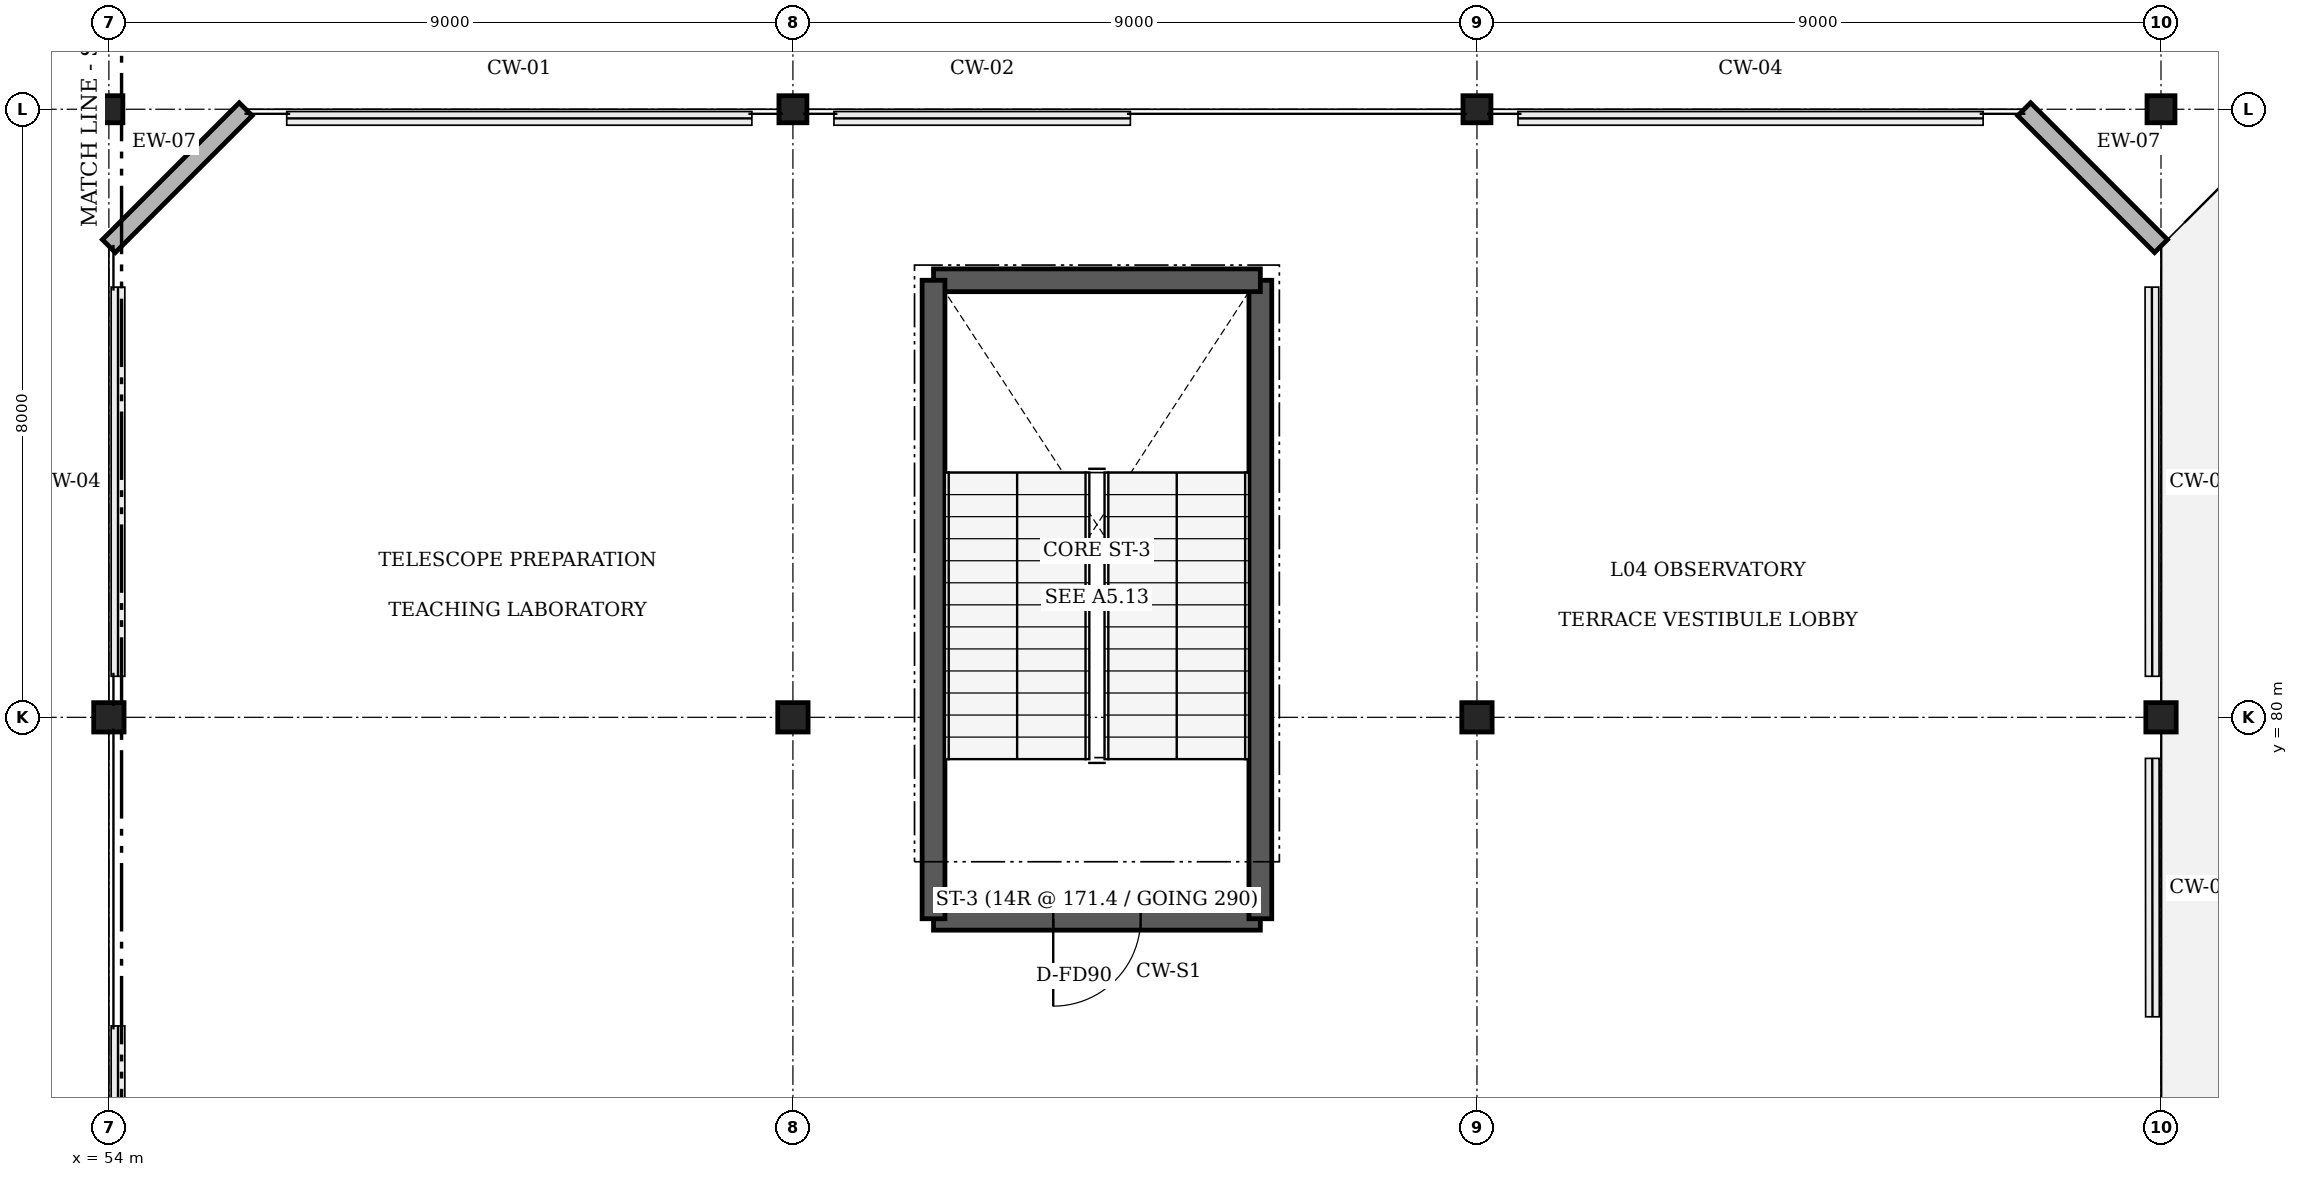
"""IFC4 building model, lengths in metres.
Left out: names, types, materials, properties, quantities, classifications, styles, units other than length and angle.
Written with IfcOpenShell. Run it as: python <this file> out.ifc"""

import sys

from ifc_helpers import new_model, si_unit, direction, frame, frame_2d, origin, origin_2d, place, context, subcontext, project, spatial, rectangle, i_section, extrude, element, fill, save


model = new_model("IFC4")
c1 = context("Model", 3, precision=1e-05, world=origin(), true_north=direction((0.0, 1.0)))
c2 = subcontext(c1, "Body", "Model", "MODEL_VIEW")
j1 = project(units=[si_unit("LENGTHUNIT", "METRE"), si_unit("PLANEANGLEUNIT", "RADIAN")], contexts=[c1])
p1 = place(None, origin())
s1 = spatial("IfcSite", under=j1, at=p1, CompositionType="ELEMENT")
p2 = place(p1, origin())
s2 = spatial("IfcBuilding", under=s1, at=p2, CompositionType="ELEMENT")
p3 = place(p2, frame((0.0, 0.0, 20.4)))
s3 = spatial("IfcBuildingStorey", under=s2, at=p3, CompositionType="ELEMENT", Elevation=20.4)
p4 = place(p3, frame((54.0, 80.0, 0.0), z_axis=(0.0, 0.0, 1.0), x_axis=(1.0, 0.0, 0.0)))
e1 = element("IfcColumn", 1, at=p4, inside=s3, PredefinedType="COLUMN", context=c2, shape_type="SweptSolid", body=[
    extrude(i_section(OverallWidth=0.399, OverallDepth=0.386, WebThickness=0.021, FlangeThickness=0.033, FilletRadius=0.015, at=origin_2d()), origin(), (0.0, 0.0, 1.0), 4.8),
])
p5 = place(p3, frame((54.0, 88.0, 0.0), z_axis=(0.0, 0.0, 1.0), x_axis=(1.0, 0.0, 0.0)))
e2 = element("IfcColumn", 2, at=p5, inside=s3, PredefinedType="COLUMN", context=c2, shape_type="SweptSolid", body=[
    extrude(i_section(OverallWidth=0.368, OverallDepth=0.356, WebThickness=0.011, FlangeThickness=0.018, FilletRadius=0.015, at=origin_2d()), origin(), (0.0, 0.0, 1.0), 4.8),
])
p6 = place(p3, frame((63.0, 80.0, 0.0), z_axis=(0.0, 0.0, 1.0), x_axis=(1.0, 0.0, 0.0)))
e3 = element("IfcColumn", 3, at=p6, inside=s3, PredefinedType="COLUMN", context=c2, shape_type="SweptSolid", body=[
    extrude(i_section(OverallWidth=0.399, OverallDepth=0.386, WebThickness=0.021, FlangeThickness=0.033, FilletRadius=0.015, at=origin_2d()), origin(), (0.0, 0.0, 1.0), 4.8),
])
p7 = place(p3, frame((63.0, 88.0, 0.0), z_axis=(0.0, 0.0, 1.0), x_axis=(1.0, 0.0, 0.0)))
e4 = element("IfcColumn", 4, at=p7, inside=s3, PredefinedType="COLUMN", context=c2, shape_type="SweptSolid", body=[
    extrude(i_section(OverallWidth=0.368, OverallDepth=0.356, WebThickness=0.011, FlangeThickness=0.018, FilletRadius=0.015, at=origin_2d()), origin(), (0.0, 0.0, 1.0), 4.8),
])
p8 = place(p3, frame((72.0, 80.0, 0.0), z_axis=(0.0, 0.0, 1.0), x_axis=(1.0, 0.0, 0.0)))
e5 = element("IfcColumn", 5, at=p8, inside=s3, PredefinedType="COLUMN", context=c2, shape_type="SweptSolid", body=[
    extrude(i_section(OverallWidth=0.399, OverallDepth=0.386, WebThickness=0.021, FlangeThickness=0.033, FilletRadius=0.015, at=origin_2d()), origin(), (0.0, 0.0, 1.0), 4.8),
])
p9 = place(p3, frame((72.0, 88.0, 0.0), z_axis=(0.0, 0.0, 1.0), x_axis=(1.0, 0.0, 0.0)))
e6 = element("IfcColumn", 6, at=p9, inside=s3, PredefinedType="COLUMN", context=c2, shape_type="SweptSolid", body=[
    extrude(i_section(OverallWidth=0.368, OverallDepth=0.356, WebThickness=0.011, FlangeThickness=0.018, FilletRadius=0.015, at=origin_2d()), origin(), (0.0, 0.0, 1.0), 4.8),
])
p10 = place(p3, frame((81.0, 80.0, 0.0), z_axis=(0.0, 0.0, 1.0), x_axis=(1.0, 0.0, 0.0)))
e7 = element("IfcColumn", 7, at=p10, inside=s3, PredefinedType="COLUMN", context=c2, shape_type="SweptSolid", body=[
    extrude(i_section(OverallWidth=0.399, OverallDepth=0.386, WebThickness=0.021, FlangeThickness=0.033, FilletRadius=0.015, at=origin_2d()), origin(), (0.0, 0.0, 1.0), 4.8),
])
p11 = place(p3, frame((81.0, 88.0, 0.0), z_axis=(0.0, 0.0, 1.0), x_axis=(1.0, 0.0, 0.0)))
e8 = element("IfcColumn", 8, at=p11, inside=s3, PredefinedType="COLUMN", context=c2, shape_type="SweptSolid", body=[
    extrude(i_section(OverallWidth=0.368, OverallDepth=0.356, WebThickness=0.011, FlangeThickness=0.018, FilletRadius=0.015, at=origin_2d()), origin(), (0.0, 0.0, 1.0), 4.8),
])
p12 = place(p3, frame((54.0, 86.2, 0.0), z_axis=(0.0, 0.0, 1.0), x_axis=(0.707106781187, 0.707106781187, 0.0)))
e9 = element("IfcWall", 9, at=p12, inside=s3, PredefinedType="SOLIDWALL", context=c2, shape_type="SweptSolid", body=[
    extrude(rectangle(XDim=2.546, YDim=0.24, at=frame_2d((1.273, 0.0))), origin(), (0.0, 0.0, 1.0), 3.601),
])
p13 = place(p3, frame((79.2, 88.0, 0.0), z_axis=(0.0, 0.0, 1.0), x_axis=(0.707106781187, -0.707106781187, 0.0)))
e10 = element("IfcWall", 10, at=p13, inside=s3, PredefinedType="SOLIDWALL", context=c2, shape_type="SweptSolid", body=[
    extrude(rectangle(XDim=2.546, YDim=0.24, at=frame_2d((1.273, 0.0))), origin(), (0.0, 0.0, 1.0), 3.674),
])
p14 = place(p3, frame((69.15, 77.35, 0.0), z_axis=(0.0, 0.0, 1.0), x_axis=(-1.0, 0.0, 0.0)))
e11 = element("IfcWall", 11, at=p14, inside=s3, PredefinedType="SOLIDWALL", context=c2, shape_type="SweptSolid", body=[
    extrude(rectangle(XDim=4.3, YDim=0.3, at=frame_2d((2.15, 0.0))), origin(), (0.0, 0.0, 1.0), 4.8),
])
p15 = place(p14, frame((1.575, 0.0, 0.0)))
e12 = element("IfcOpeningElement", 12, at=p15, cuts=e11, PredefinedType="OPENING", context=c2, shape_type="SweptSolid", body=[
    extrude(rectangle(XDim=1.15, YDim=2.2, at=frame_2d((0.575, 1.1))), frame((0.0, 0.16, 0.0), z_axis=(0.0, -1.0, 0.0), x_axis=(1.0, 0.0, 0.0)), (0.0, 0.0, 1.0), 0.32),
])
p16 = place(p3, frame((69.15, 77.35, 0.0), z_axis=(0.0, 0.0, 1.0), x_axis=(0.0, 1.0, 0.0)))
e13 = element("IfcWall", 13, at=p16, inside=s3, PredefinedType="SOLIDWALL", context=c2, shape_type="SweptSolid", body=[
    extrude(rectangle(XDim=8.4, YDim=0.3, at=frame_2d((4.2, 0.0))), origin(), (0.0, 0.0, 1.0), 4.8),
])
p17 = place(p3, frame((69.15, 85.75, 0.0), z_axis=(0.0, 0.0, 1.0), x_axis=(-1.0, 0.0, 0.0)))
e14 = element("IfcWall", 14, at=p17, inside=s3, PredefinedType="SOLIDWALL", context=c2, shape_type="SweptSolid", body=[
    extrude(rectangle(XDim=4.3, YDim=0.3, at=frame_2d((2.15, 0.0))), origin(), (0.0, 0.0, 1.0), 4.8),
])
p18 = place(p3, frame((64.85, 77.35, 0.0), z_axis=(0.0, 0.0, 1.0), x_axis=(0.0, 1.0, 0.0)))
e15 = element("IfcWall", 15, at=p18, inside=s3, PredefinedType="SOLIDWALL", context=c2, shape_type="SweptSolid", body=[
    extrude(rectangle(XDim=8.4, YDim=0.3, at=frame_2d((4.2, 0.0))), origin(), (0.0, 0.0, 1.0), 4.8),
])
p19 = place(p15, origin())
e16 = element("IfcDoor", 16, at=p19, inside=s3, OperationType="SINGLE_SWING_RIGHT", PredefinedType="DOOR", context=c2, shape_type="SweptSolid", body=[
    extrude(rectangle(XDim=1.15, YDim=2.2, at=frame_2d((0.575, 1.1))), frame((0.0, 0.025, 0.0), z_axis=(0.0, -1.0, 0.0), x_axis=(1.0, 0.0, 0.0)), (0.0, 0.0, 1.0), 0.05),
])
fill(e12, e16)
save(model, sys.argv[1])
